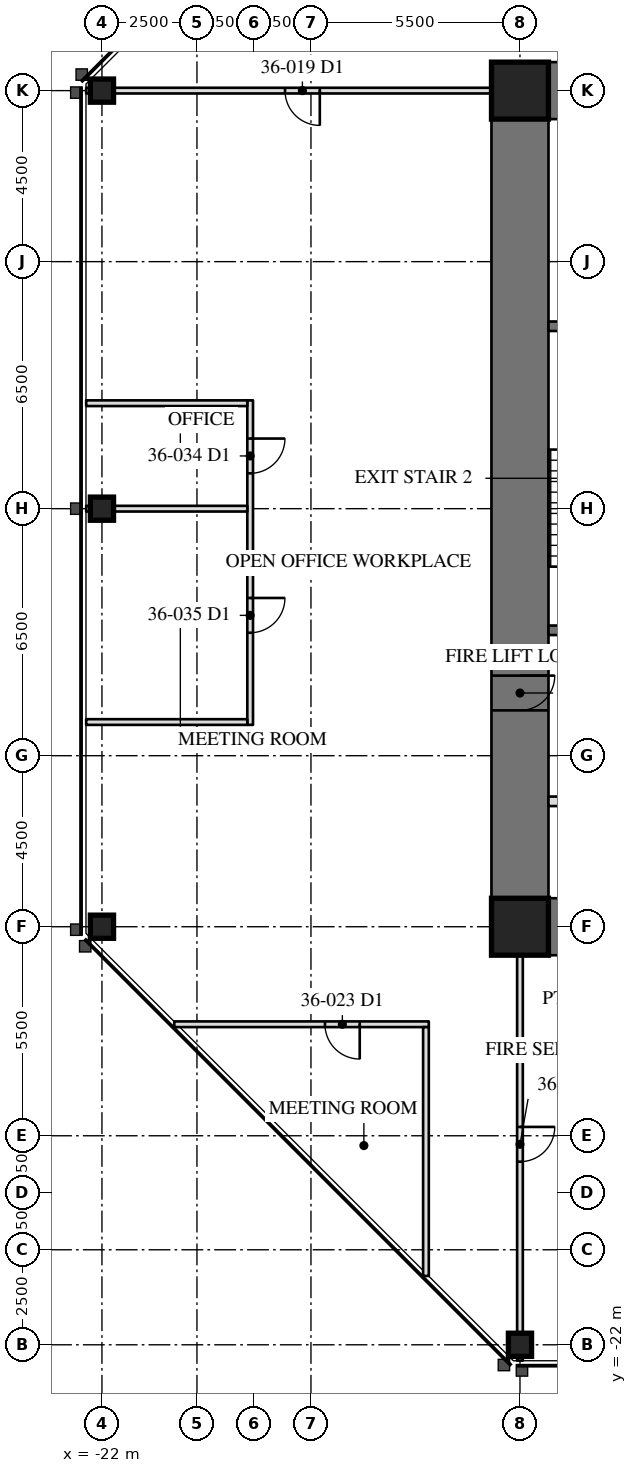
"""IFC4 building model, lengths in metres.
Left out: names, types, materials, properties, quantities, classifications, styles, units other than length and angle.
Written with IfcOpenShell. Run it as: python <this file> out.ifc"""

import sys

from ifc_helpers import new_model, si_unit, direction, frame, frame_2d, origin, origin_2d, place, context, subcontext, project, spatial, rectangle, hollow_rectangle, extrude, element, fill, save


model = new_model("IFC4")
c1 = context("Model", 3, precision=1e-05, world=origin(), true_north=direction((0.0, 1.0)))
c2 = subcontext(c1, "Body", "Model", "MODEL_VIEW")
j1 = project(units=[si_unit("LENGTHUNIT", "METRE"), si_unit("PLANEANGLEUNIT", "RADIAN")], contexts=[c1])
p1 = place(None, origin())
s1 = spatial("IfcSite", under=j1, at=p1, CompositionType="ELEMENT")
p2 = place(p1, origin())
s2 = spatial("IfcBuilding", under=s1, at=p2, CompositionType="ELEMENT")
p3 = place(p2, frame((0.0, 0.0, 154.1)))
s3 = spatial("IfcBuildingStorey", under=s2, at=p3, CompositionType="ELEMENT", Elevation=154.1)
for number, where, z_axis, x_axis in (
    (1, (-22.0, 0.0, 0.0), (0.0, 0.0, 1.0), (0.0, 1.0, 0.0)),
    (2, (-22.0, -11.0, 0.0), (0.0, 0.0, 1.0), (0.0, 1.0, 0.0)),
    (3, (-11.0, -22.0, 0.0), (0.0, 0.0, 1.0), (1.0, 0.0, 0.0)),
    (4, (-22.0, 11.0, 0.0), (0.0, 0.0, 1.0), (0.0, 1.0, 0.0)),
):
    element("IfcColumn", number, at=place(p3, frame(where, z_axis=z_axis, x_axis=x_axis)), inside=s3, PredefinedType="COLUMN", context=c2, shape_type="SweptSolid", body=[
        extrude(hollow_rectangle(XDim=0.61, YDim=0.61, WallThickness=0.076, at=origin_2d()), origin(), (0.0, 0.0, 1.0), 4.1),
    ])
p4 = place(p3, frame((-11.0, 11.0, 0.0), z_axis=(0.0, 0.0, 1.0), x_axis=(0.0, -1.0, 0.0)))
e5 = element("IfcWall", 5, at=p4, inside=s3, PredefinedType="SHEAR", context=c2, shape_type="SweptSolid", body=[
    extrude(rectangle(XDim=22.0, YDim=1.5, at=frame_2d((11.0, 0.0))), origin(), (0.0, 0.0, 1.0), 4.1),
])
p5 = place(p4, frame((15.393, 0.0, 0.0)))
e6 = element("IfcOpeningElement", 6, at=p5, cuts=e5, PredefinedType="OPENING", context=c2, shape_type="SweptSolid", body=[
    extrude(rectangle(XDim=0.915, YDim=2.134, at=frame_2d((0.458, 1.067))), frame((0.0, 0.76, 0.0), z_axis=(0.0, -1.0, 0.0), x_axis=(1.0, 0.0, 0.0)), (0.0, 0.0, 1.0), 1.52),
])
for number, where, z_axis, x_axis in (
    (7, (-6.5, 11.0, 0.0), (0.0, 0.0, 1.0), (-1.0, 0.0, 0.0)),
    (8, (-11.0, -11.0, 0.0), (0.0, 0.0, 1.0), (1.0, 0.0, 0.0)),
):
    element("IfcWall", number, at=place(p3, frame(where, z_axis=z_axis, x_axis=x_axis)), inside=s3, PredefinedType="SHEAR", context=c2, shape_type="SweptSolid", body=[
        extrude(rectangle(XDim=4.5, YDim=1.5, at=frame_2d((2.25, 0.0))), origin(), (0.0, 0.0, 1.0), 4.1),
    ])
for number, where, z_axis, x_axis in (
    (9, (-11.0, 11.0, 0.0), (0.0, 0.0, 1.0), (1.0, 0.0, 0.0)),
    (10, (-11.0, -11.0, 0.0), (0.0, 0.0, 1.0), (1.0, 0.0, 0.0)),
):
    element("IfcColumn", number, at=place(p3, frame(where, z_axis=z_axis, x_axis=x_axis)), inside=s3, PredefinedType="COLUMN", context=c2, shape_type="SweptSolid", body=[
        extrude(hollow_rectangle(XDim=1.499, YDim=1.499, WallThickness=0.102, at=origin_2d()), origin(), (0.0, 0.0, 1.0), 4.1),
    ])
p6 = place(p3, frame((-6.95, 4.8, 0.0), z_axis=(0.0, 0.0, 1.0), x_axis=(-1.0, 0.0, 0.0)))
e11 = element("IfcWall", 11, at=p6, inside=s3, PredefinedType="SOLIDWALL", context=c2, shape_type="SweptSolid", body=[
    extrude(rectangle(XDim=3.3, YDim=0.25, at=frame_2d((1.65, 0.0))), origin(), (0.0, 0.0, 1.0), 3.91),
])
p7 = place(p3, frame((-6.95, -3.2, 0.0), z_axis=(0.0, 0.0, 1.0), x_axis=(-1.0, 0.0, 0.0)))
e12 = element("IfcWall", 12, at=p7, inside=s3, PredefinedType="SOLIDWALL", context=c2, shape_type="SweptSolid", body=[
    extrude(rectangle(XDim=3.3, YDim=0.25, at=frame_2d((1.65, 0.0))), origin(), (0.0, 0.0, 1.0), 3.91),
])
p8 = place(p7, frame((1.116, 0.0, 0.0)))
e13 = element("IfcOpeningElement", 13, at=p8, cuts=e12, PredefinedType="OPENING", context=c2, shape_type="SweptSolid", body=[
    extrude(rectangle(XDim=1.067, YDim=2.134, at=frame_2d((0.533, 1.067))), frame((0.0, 0.135, 0.0), z_axis=(0.0, -1.0, 0.0), x_axis=(1.0, 0.0, 0.0)), (0.0, 0.0, 1.0), 0.27),
])
p9 = place(p3, frame((-6.95, -7.7, 0.0), z_axis=(0.0, 0.0, 1.0), x_axis=(-1.0, 0.0, 0.0)))
e14 = element("IfcWall", 14, at=p9, inside=s3, PredefinedType="PARTITIONING", context=c2, shape_type="SweptSolid", body=[
    extrude(rectangle(XDim=3.3, YDim=0.25, at=frame_2d((1.65, 0.0))), origin(), (0.0, 0.0, 1.0), 3.91),
])
p10 = place(p9, frame((0.45, 0.0, 0.0)))
e15 = element("IfcOpeningElement", 15, at=p10, cuts=e14, PredefinedType="OPENING", context=c2, shape_type="SweptSolid", body=[
    extrude(rectangle(XDim=1.219, YDim=2.134, at=frame_2d((0.609, 1.067))), frame((0.0, 0.135, 0.0), z_axis=(0.0, -1.0, 0.0), x_axis=(1.0, 0.0, 0.0)), (0.0, 0.0, 1.0), 0.27),
])
p11 = place(p3, frame((-11.75, 11.0, 0.0), z_axis=(0.0, 0.0, 1.0), x_axis=(-1.0, 0.0, 0.0)))
e16 = element("IfcWall", 16, at=p11, inside=s3, PredefinedType="PARTITIONING", context=c2, shape_type="SweptSolid", body=[
    extrude(rectangle(XDim=10.665, YDim=0.15, at=frame_2d((5.333, 0.0))), origin(), (0.0, 0.0, 1.0), 3.326),
])
p12 = place(p11, frame((4.518, 0.0, 0.0)))
e17 = element("IfcOpeningElement", 17, at=p12, cuts=e16, PredefinedType="OPENING", context=c2, shape_type="SweptSolid", body=[
    extrude(rectangle(XDim=0.915, YDim=2.134, at=frame_2d((0.458, 1.067))), frame((0.0, 0.085, 0.0), z_axis=(0.0, -1.0, 0.0), x_axis=(1.0, 0.0, 0.0)), (0.0, 0.0, 1.0), 0.17),
])
p13 = place(p3, frame((-11.0, -11.75, 0.0), z_axis=(0.0, 0.0, 1.0), x_axis=(0.0, -1.0, 0.0)))
e18 = element("IfcWall", 18, at=p13, inside=s3, PredefinedType="PARTITIONING", context=c2, shape_type="SweptSolid", body=[
    extrude(rectangle(XDim=10.665, YDim=0.15, at=frame_2d((5.333, 0.0))), origin(), (0.0, 0.0, 1.0), 3.326),
])
p14 = place(p13, frame((4.518, 0.0, 0.0)))
e19 = element("IfcOpeningElement", 19, at=p14, cuts=e18, PredefinedType="OPENING", context=c2, shape_type="SweptSolid", body=[
    extrude(rectangle(XDim=0.915, YDim=2.134, at=frame_2d((0.458, 1.067))), frame((0.0, 0.085, 0.0), z_axis=(0.0, -1.0, 0.0), x_axis=(1.0, 0.0, 0.0)), (0.0, 0.0, 1.0), 0.17),
])
p15 = place(p3, frame((-13.399, -13.566, 0.0), z_axis=(0.0, 0.0, 1.0), x_axis=(-1.0, 0.0, 0.0)))
e20 = element("IfcWall", 20, at=p15, inside=s3, PredefinedType="PARTITIONING", context=c2, shape_type="SweptSolid", body=[
    extrude(rectangle(XDim=6.698, YDim=0.15, at=frame_2d((3.349, 0.0))), origin(), (0.0, 0.0, 1.0), 3.91),
])
p16 = place(p15, frame((1.817, 0.0, 0.0)))
e21 = element("IfcOpeningElement", 21, at=p16, cuts=e20, PredefinedType="OPENING", context=c2, shape_type="SweptSolid", body=[
    extrude(rectangle(XDim=0.915, YDim=2.134, at=frame_2d((0.458, 1.067))), frame((0.0, 0.085, 0.0), z_axis=(0.0, -1.0, 0.0), x_axis=(1.0, 0.0, 0.0)), (0.0, 0.0, 1.0), 0.17),
])
p17 = place(p3, frame((-13.474, -13.641, 0.0), z_axis=(0.0, 0.0, 1.0), x_axis=(0.0, -1.0, 0.0)))
e22 = element("IfcWall", 22, at=p17, inside=s3, PredefinedType="PARTITIONING", context=c2, shape_type="SweptSolid", body=[
    extrude(rectangle(XDim=6.548, YDim=0.15, at=frame_2d((3.274, 0.0))), origin(), (0.0, 0.0, 1.0), 3.91),
])
p18 = place(p3, frame((-18.1, 2.85, 0.0), z_axis=(0.0, 0.0, 1.0), x_axis=(0.0, -1.0, 0.0)))
e23 = element("IfcWall", 23, at=p18, inside=s3, PredefinedType="PARTITIONING", context=c2, shape_type="SweptSolid", body=[
    extrude(rectangle(XDim=8.539, YDim=0.15, at=frame_2d((4.27, 0.0))), origin(), (0.0, 0.0, 1.0), 3.91),
])
p19 = place(p18, frame((1.005, 0.0, 0.0)))
e24 = element("IfcOpeningElement", 24, at=p19, cuts=e23, PredefinedType="OPENING", context=c2, shape_type="SweptSolid", body=[
    extrude(rectangle(XDim=0.915, YDim=2.134, at=frame_2d((0.458, 1.067))), frame((0.0, 0.085, 0.0), z_axis=(0.0, -1.0, 0.0), x_axis=(1.0, 0.0, 0.0)), (0.0, 0.0, 1.0), 0.17),
])
p20 = place(p18, frame((5.199, 0.0, 0.0)))
e25 = element("IfcOpeningElement", 25, at=p20, cuts=e23, PredefinedType="OPENING", context=c2, shape_type="SweptSolid", body=[
    extrude(rectangle(XDim=0.915, YDim=2.134, at=frame_2d((0.458, 1.067))), frame((0.0, 0.085, 0.0), z_axis=(0.0, -1.0, 0.0), x_axis=(1.0, 0.0, 0.0)), (0.0, 0.0, 1.0), 0.17),
])
p21 = place(p3, frame((-18.175, 2.775, 0.0), z_axis=(0.0, 0.0, 1.0), x_axis=(-1.0, 0.0, 0.0)))
e26 = element("IfcWall", 26, at=p21, inside=s3, PredefinedType="PARTITIONING", context=c2, shape_type="SweptSolid", body=[
    extrude(rectangle(XDim=4.24, YDim=0.15, at=frame_2d((2.12, 0.0))), origin(), (0.0, 0.0, 1.0), 3.91),
])
p22 = place(p3, frame((-18.175, 0.0, 0.0), z_axis=(0.0, 0.0, 1.0), x_axis=(-1.0, 0.0, 0.0)))
e27 = element("IfcWall", 27, at=p22, inside=s3, PredefinedType="PARTITIONING", context=c2, shape_type="SweptSolid", body=[
    extrude(rectangle(XDim=4.24, YDim=0.15, at=frame_2d((2.12, 0.0))), origin(), (0.0, 0.0, 1.0), 3.326),
])
p23 = place(p3, frame((-18.175, -5.614, 0.0), z_axis=(0.0, 0.0, 1.0), x_axis=(-1.0, 0.0, 0.0)))
e28 = element("IfcWall", 28, at=p23, inside=s3, PredefinedType="PARTITIONING", context=c2, shape_type="SweptSolid", body=[
    extrude(rectangle(XDim=4.24, YDim=0.15, at=frame_2d((2.12, 0.0))), origin(), (0.0, 0.0, 1.0), 3.91),
])
p24 = place(p5, origin())
e29 = element("IfcDoor", 29, at=p24, inside=s3, OperationType="SINGLE_SWING_RIGHT", PredefinedType="DOOR", context=c2, shape_type="SweptSolid", body=[
    extrude(rectangle(XDim=0.915, YDim=2.134, at=frame_2d((0.458, 1.067))), frame((0.0, -0.675, 0.0), z_axis=(0.0, -1.0, 0.0), x_axis=(1.0, 0.0, 0.0)), (0.0, 0.0, 1.0), 0.05),
])
fill(e6, e29)
p25 = place(p12, origin())
e30 = element("IfcDoor", 30, at=p25, inside=s3, OperationType="SINGLE_SWING_LEFT", PredefinedType="DOOR", context=c2, shape_type="SweptSolid", body=[
    extrude(rectangle(XDim=0.915, YDim=2.134, at=frame_2d((0.458, 1.067))), frame((0.0, 0.025, 0.0), z_axis=(0.0, -1.0, 0.0), x_axis=(1.0, 0.0, 0.0)), (0.0, 0.0, 1.0), 0.05),
])
fill(e17, e30)
p26 = place(p14, origin())
e31 = element("IfcDoor", 31, at=p26, inside=s3, OperationType="SINGLE_SWING_LEFT", PredefinedType="DOOR", context=c2, shape_type="SweptSolid", body=[
    extrude(rectangle(XDim=0.915, YDim=2.134, at=frame_2d((0.458, 1.067))), frame((0.0, 0.025, 0.0), z_axis=(0.0, -1.0, 0.0), x_axis=(1.0, 0.0, 0.0)), (0.0, 0.0, 1.0), 0.05),
])
fill(e19, e31)
p27 = place(p16, origin())
e32 = element("IfcDoor", 32, at=p27, inside=s3, OperationType="SINGLE_SWING_LEFT", PredefinedType="DOOR", context=c2, shape_type="SweptSolid", body=[
    extrude(rectangle(XDim=0.915, YDim=2.134, at=frame_2d((0.458, 1.067))), frame((0.0, 0.025, 0.0), z_axis=(0.0, -1.0, 0.0), x_axis=(1.0, 0.0, 0.0)), (0.0, 0.0, 1.0), 0.05),
])
fill(e21, e32)
p28 = place(p19, origin())
e33 = element("IfcDoor", 33, at=p28, inside=s3, OperationType="SINGLE_SWING_LEFT", PredefinedType="DOOR", context=c2, shape_type="SweptSolid", body=[
    extrude(rectangle(XDim=0.915, YDim=2.134, at=frame_2d((0.458, 1.067))), frame((0.0, 0.025, 0.0), z_axis=(0.0, -1.0, 0.0), x_axis=(1.0, 0.0, 0.0)), (0.0, 0.0, 1.0), 0.05),
])
fill(e24, e33)
p29 = place(p20, origin())
e34 = element("IfcDoor", 34, at=p29, inside=s3, OperationType="SINGLE_SWING_LEFT", PredefinedType="DOOR", context=c2, shape_type="SweptSolid", body=[
    extrude(rectangle(XDim=0.915, YDim=2.134, at=frame_2d((0.458, 1.067))), frame((0.0, 0.025, 0.0), z_axis=(0.0, -1.0, 0.0), x_axis=(1.0, 0.0, 0.0)), (0.0, 0.0, 1.0), 0.05),
])
fill(e25, e34)
save(model, sys.argv[1])
